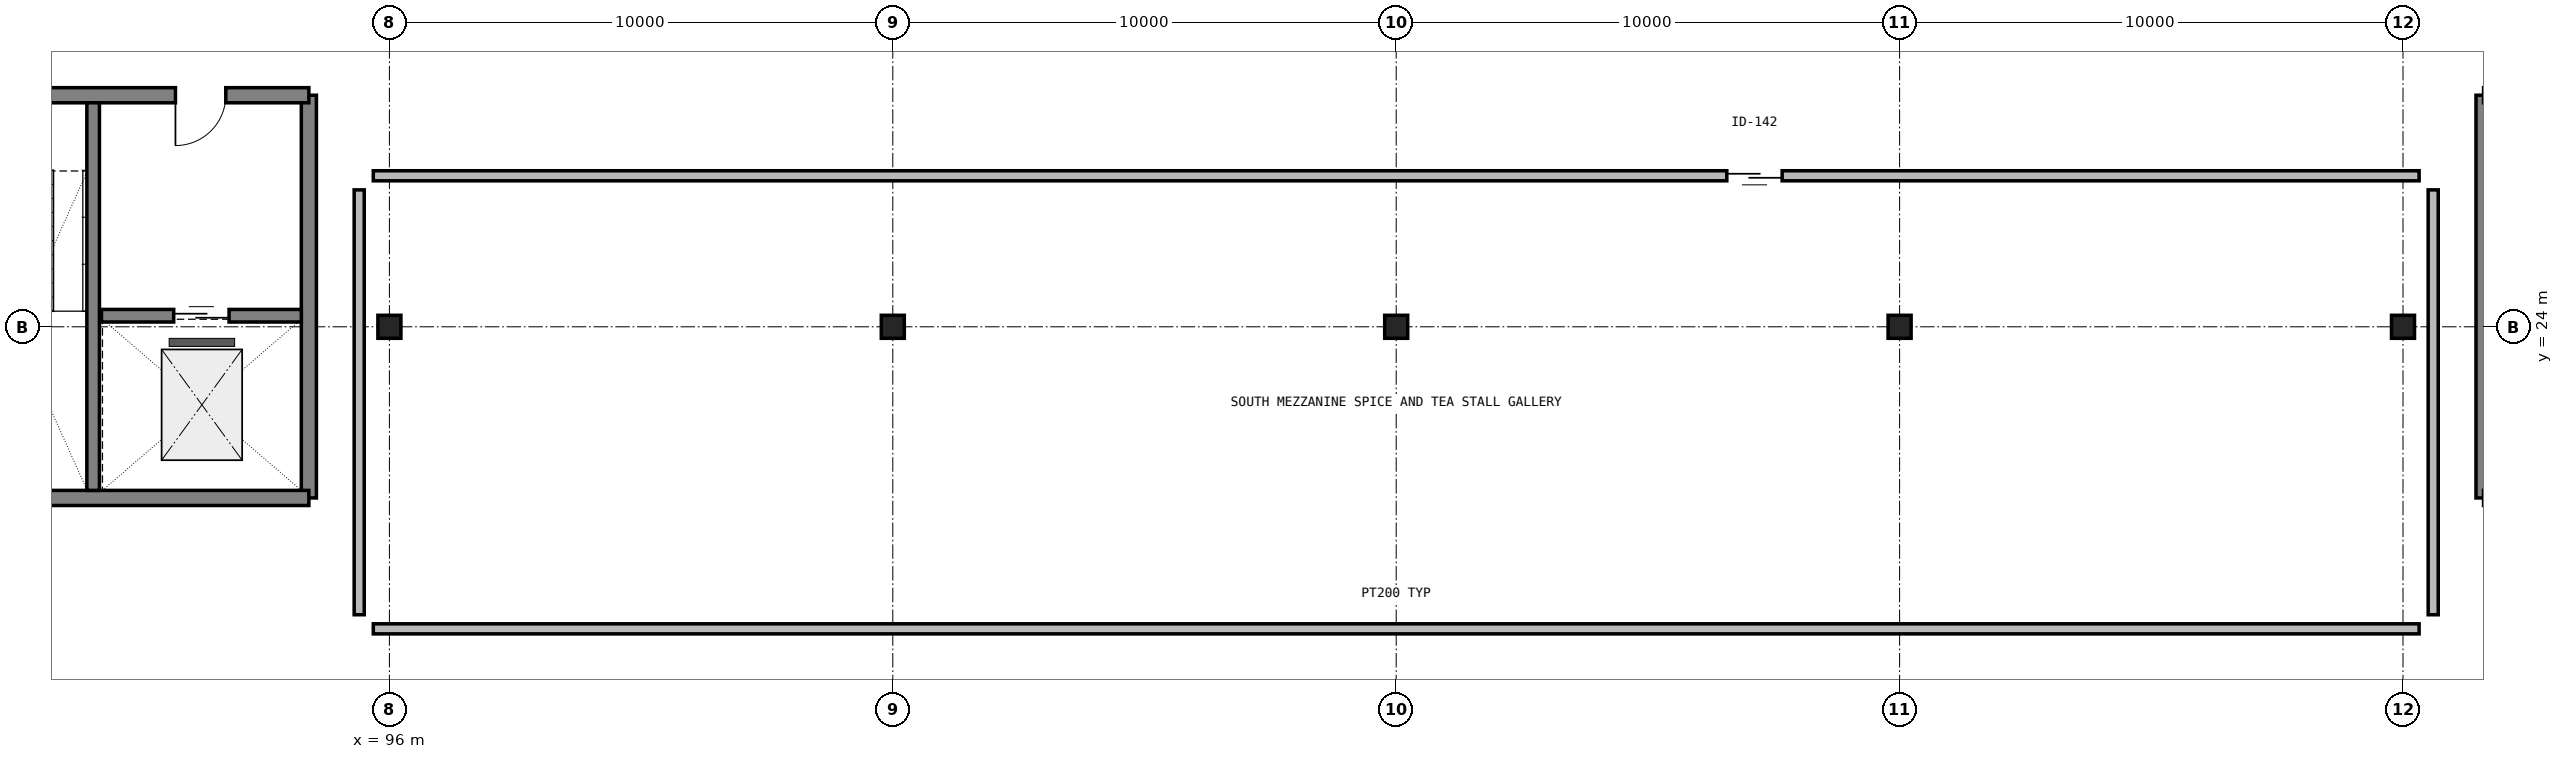
"""IFC4 building model, lengths in metres.
Left out: names, types, materials, properties, quantities, classifications, styles, units other than length and angle.
Written with IfcOpenShell. Run it as: python <this file> out.ifc"""

import sys

from ifc_helpers import new_model, si_unit, direction, frame, frame_2d, origin, origin_2d_with_axis, place, context, subcontext, project, spatial, rectangle, hollow_circle, extrude, element, fill, save


model = new_model("IFC4")
c1 = context("Model", 3, precision=1e-05, world=origin(), true_north=direction((0.0, 1.0)))
c2 = subcontext(c1, "Body", "Model", "MODEL_VIEW")
j1 = project(units=[si_unit("LENGTHUNIT", "METRE"), si_unit("PLANEANGLEUNIT", "RADIAN")], contexts=[c1])
p1 = place(None, origin())
s1 = spatial("IfcSite", under=j1, at=p1, CompositionType="ELEMENT")
p2 = place(p1, origin())
s2 = spatial("IfcBuilding", under=s1, at=p2, CompositionType="ELEMENT")
p3 = place(p2, frame((0.0, 0.0, 4.5)))
s3 = spatial("IfcBuildingStorey", under=s2, at=p3, CompositionType="ELEMENT", Elevation=4.5)
for number, where, z_axis, x_axis in (
    (1, (96.0, 24.0, 0.0), (0.0, 0.0, 1.0), (1.0, 0.0, 0.0)),
    (2, (106.0, 24.0, 0.0), (0.0, 0.0, 1.0), (1.0, 0.0, 0.0)),
    (3, (116.0, 24.0, 0.0), (0.0, 0.0, 1.0), (1.0, 0.0, 0.0)),
    (4, (126.0, 24.0, 0.0), (0.0, 0.0, 1.0), (1.0, 0.0, 0.0)),
    (5, (136.0, 24.0, 0.0), (0.0, 0.0, 1.0), (1.0, 0.0, 0.0)),
):
    element("IfcColumn", number, at=place(p3, frame(where, z_axis=z_axis, x_axis=x_axis)), inside=s3, PredefinedType="COLUMN", context=c2, shape_type="SweptSolid", body=[
        extrude(hollow_circle(Radius=0.229, WallThickness=0.013, at=origin_2d_with_axis()), origin(), (0.0, 0.0, 1.0), 3.9),
    ])
p4 = place(p3, frame((94.4, 20.6, 0.0), z_axis=(0.0, 0.0, 1.0), x_axis=(0.0, 1.0, 0.0)))
e6 = element("IfcWall", 6, at=p4, inside=s3, PredefinedType="SHEAR", context=c2, shape_type="SweptSolid", body=[
    extrude(rectangle(XDim=8.0, YDim=0.3, at=frame_2d((4.0, 0.0), x_axis=(1.0, 0.0))), origin(), (0.0, 0.0, 1.0), 3.9),
])
p5 = place(p3, frame((87.0, 20.6, 0.0), z_axis=(0.0, 0.0, 1.0), x_axis=(1.0, 0.0, 0.0)))
e7 = element("IfcWall", 7, at=p5, inside=s3, PredefinedType="SHEAR", context=c2, shape_type="SweptSolid", body=[
    extrude(rectangle(XDim=7.4, YDim=0.3, at=frame_2d((3.7, 0.0), x_axis=(1.0, 0.0))), origin(), (0.0, 0.0, 1.0), 3.9),
])
p6 = place(p3, frame((94.4, 28.6, 0.0), z_axis=(0.0, 0.0, 1.0), x_axis=(-1.0, 0.0, 0.0)))
e8 = element("IfcWall", 8, at=p6, inside=s3, PredefinedType="SHEAR", context=c2, shape_type="SweptSolid", body=[
    extrude(rectangle(XDim=7.4, YDim=0.3, at=frame_2d((3.7, 0.0), x_axis=(1.0, 0.0))), origin(), (0.0, 0.0, 1.0), 3.9),
])
p7 = place(p6, frame((1.65, 0.0, 0.0)))
e9 = element("IfcOpeningElement", 9, at=p7, cuts=e8, PredefinedType="OPENING", context=c2, shape_type="SweptSolid", body=[
    extrude(rectangle(XDim=1.0, YDim=2.15, at=frame_2d((0.5, 1.075), x_axis=(1.0, 0.0))), frame((0.0, 0.16, 0.0), z_axis=(0.0, -1.0, 0.0), x_axis=(1.0, 0.0, 0.0)), (0.0, 0.0, 1.0), 0.32),
])
p8 = place(p6, frame((5.3, 0.0, 0.0)))
e10 = element("IfcOpeningElement", 10, at=p8, cuts=e8, PredefinedType="OPENING", context=c2, shape_type="SweptSolid", body=[
    extrude(rectangle(XDim=1.0, YDim=2.15, at=frame_2d((0.5, 1.075), x_axis=(1.0, 0.0))), frame((0.0, 0.16, 0.0), z_axis=(0.0, -1.0, 0.0), x_axis=(1.0, 0.0, 0.0)), (0.0, 0.0, 1.0), 0.32),
])
p9 = place(p3, frame((90.115, 20.75, 0.0), z_axis=(0.0, 0.0, 1.0), x_axis=(0.0, 1.0, 0.0)))
e11 = element("IfcWall", 11, at=p9, inside=s3, PredefinedType="SHEAR", context=c2, shape_type="SweptSolid", body=[
    extrude(rectangle(XDim=7.7, YDim=0.25, at=frame_2d((3.85, 0.0), x_axis=(1.0, 0.0))), origin(), (0.0, 0.0, 1.0), 3.9),
])
p10 = place(p3, frame((90.28, 24.22, 0.0), z_axis=(0.0, 0.0, 1.0), x_axis=(1.0, 0.0, 0.0)))
e12 = element("IfcWall", 12, at=p10, inside=s3, PredefinedType="SHEAR", context=c2, shape_type="SweptSolid", body=[
    extrude(rectangle(XDim=3.97, YDim=0.25, at=frame_2d((1.985, 0.0), x_axis=(1.0, 0.0))), origin(), (0.0, 0.0, 1.0), 3.65),
])
p11 = place(p10, frame((1.435, 0.0, 0.0)))
e13 = element("IfcOpeningElement", 13, at=p11, cuts=e12, PredefinedType="OPENING", context=c2, shape_type="SweptSolid", body=[
    extrude(rectangle(XDim=1.1, YDim=2.15, at=frame_2d((0.55, 1.075), x_axis=(1.0, 0.0))), frame((0.0, 0.135, 0.0), z_axis=(0.0, -1.0, 0.0), x_axis=(1.0, 0.0, 0.0)), (0.0, 0.0, 1.0), 0.27),
])
p12 = place(p3, frame((137.6, 28.6, 0.0), z_axis=(0.0, 0.0, 1.0), x_axis=(0.0, -1.0, 0.0)))
e14 = element("IfcWall", 14, at=p12, inside=s3, PredefinedType="SHEAR", context=c2, shape_type="SweptSolid", body=[
    extrude(rectangle(XDim=8.0, YDim=0.3, at=frame_2d((4.0, 0.0), x_axis=(1.0, 0.0))), origin(), (0.0, 0.0, 1.0), 3.9),
])
p13 = place(p3, frame((95.68, 18.0, 0.0), z_axis=(0.0, 0.0, 1.0), x_axis=(1.0, 0.0, 0.0)))
e15 = element("IfcWall", 15, at=p13, inside=s3, PredefinedType="MOVABLE", context=c2, shape_type="SweptSolid", body=[
    extrude(rectangle(XDim=40.64, YDim=0.2, at=frame_2d((20.32, 0.0), x_axis=(1.0, 0.0))), origin(), (0.0, 0.0, 1.0), 3.03),
])
p14 = place(p3, frame((136.6, 18.28, 0.0), z_axis=(0.0, 0.0, 1.0), x_axis=(0.0, 1.0, 0.0)))
e16 = element("IfcWall", 16, at=p14, inside=s3, PredefinedType="MOVABLE", context=c2, shape_type="SweptSolid", body=[
    extrude(rectangle(XDim=8.44, YDim=0.2, at=frame_2d((4.22, 0.0), x_axis=(1.0, 0.0))), origin(), (0.0, 0.0, 1.0), 3.03),
])
p15 = place(p3, frame((136.32, 27.0, 0.0), z_axis=(0.0, 0.0, 1.0), x_axis=(-1.0, 0.0, 0.0)))
e17 = element("IfcWall", 17, at=p15, inside=s3, PredefinedType="MOVABLE", context=c2, shape_type="SweptSolid", body=[
    extrude(rectangle(XDim=40.64, YDim=0.2, at=frame_2d((20.32, 0.0), x_axis=(1.0, 0.0))), origin(), (0.0, 0.0, 1.0), 3.03),
])
p16 = place(p15, frame((12.653, 0.0, 0.0)))
e18 = element("IfcOpeningElement", 18, at=p16, cuts=e17, PredefinedType="OPENING", context=c2, shape_type="SweptSolid", body=[
    extrude(rectangle(XDim=1.1, YDim=2.15, at=frame_2d((0.55, 1.075), x_axis=(1.0, 0.0))), frame((0.0, 0.11, 0.0), z_axis=(0.0, -1.0, 0.0), x_axis=(1.0, 0.0, 0.0)), (0.0, 0.0, 1.0), 0.22),
])
p17 = place(p3, frame((95.4, 26.72, 0.0), z_axis=(0.0, 0.0, 1.0), x_axis=(0.0, -1.0, 0.0)))
e19 = element("IfcWall", 19, at=p17, inside=s3, PredefinedType="MOVABLE", context=c2, shape_type="SweptSolid", body=[
    extrude(rectangle(XDim=8.44, YDim=0.2, at=frame_2d((4.22, 0.0), x_axis=(1.0, 0.0))), origin(), (0.0, 0.0, 1.0), 3.03),
])
p18 = place(p7, origin())
e20 = element("IfcDoor", 20, at=p18, inside=s3, OperationType="SINGLE_SWING_RIGHT", PredefinedType="DOOR", context=c2, shape_type="SweptSolid", body=[
    extrude(rectangle(XDim=1.0, YDim=2.15, at=frame_2d((0.5, 1.075), x_axis=(1.0, 0.0))), frame((0.0, 0.025, 0.0), z_axis=(0.0, -1.0, 0.0), x_axis=(1.0, 0.0, 0.0)), (0.0, 0.0, 1.0), 0.05),
])
fill(e9, e20)
p19 = place(p11, origin())
e21 = element("IfcDoor", 21, at=p19, inside=s3, OperationType="SLIDING_TO_LEFT", PredefinedType="DOOR", context=c2, shape_type="SweptSolid", body=[
    extrude(rectangle(XDim=1.1, YDim=2.15, at=frame_2d((0.55, 1.075), x_axis=(1.0, 0.0))), frame((0.0, 0.025, 0.0), z_axis=(0.0, -1.0, 0.0), x_axis=(1.0, 0.0, 0.0)), (0.0, 0.0, 1.0), 0.05),
])
fill(e13, e21)
p20 = place(p16, origin())
e22 = element("IfcDoor", 22, at=p20, inside=s3, OperationType="SLIDING_TO_LEFT", PredefinedType="DOOR", context=c2, shape_type="SweptSolid", body=[
    extrude(rectangle(XDim=1.1, YDim=2.15, at=frame_2d((0.55, 1.075), x_axis=(1.0, 0.0))), frame((0.0, 0.025, 0.0), z_axis=(0.0, -1.0, 0.0), x_axis=(1.0, 0.0, 0.0)), (0.0, 0.0, 1.0), 0.05),
])
fill(e18, e22)
save(model, sys.argv[1])
